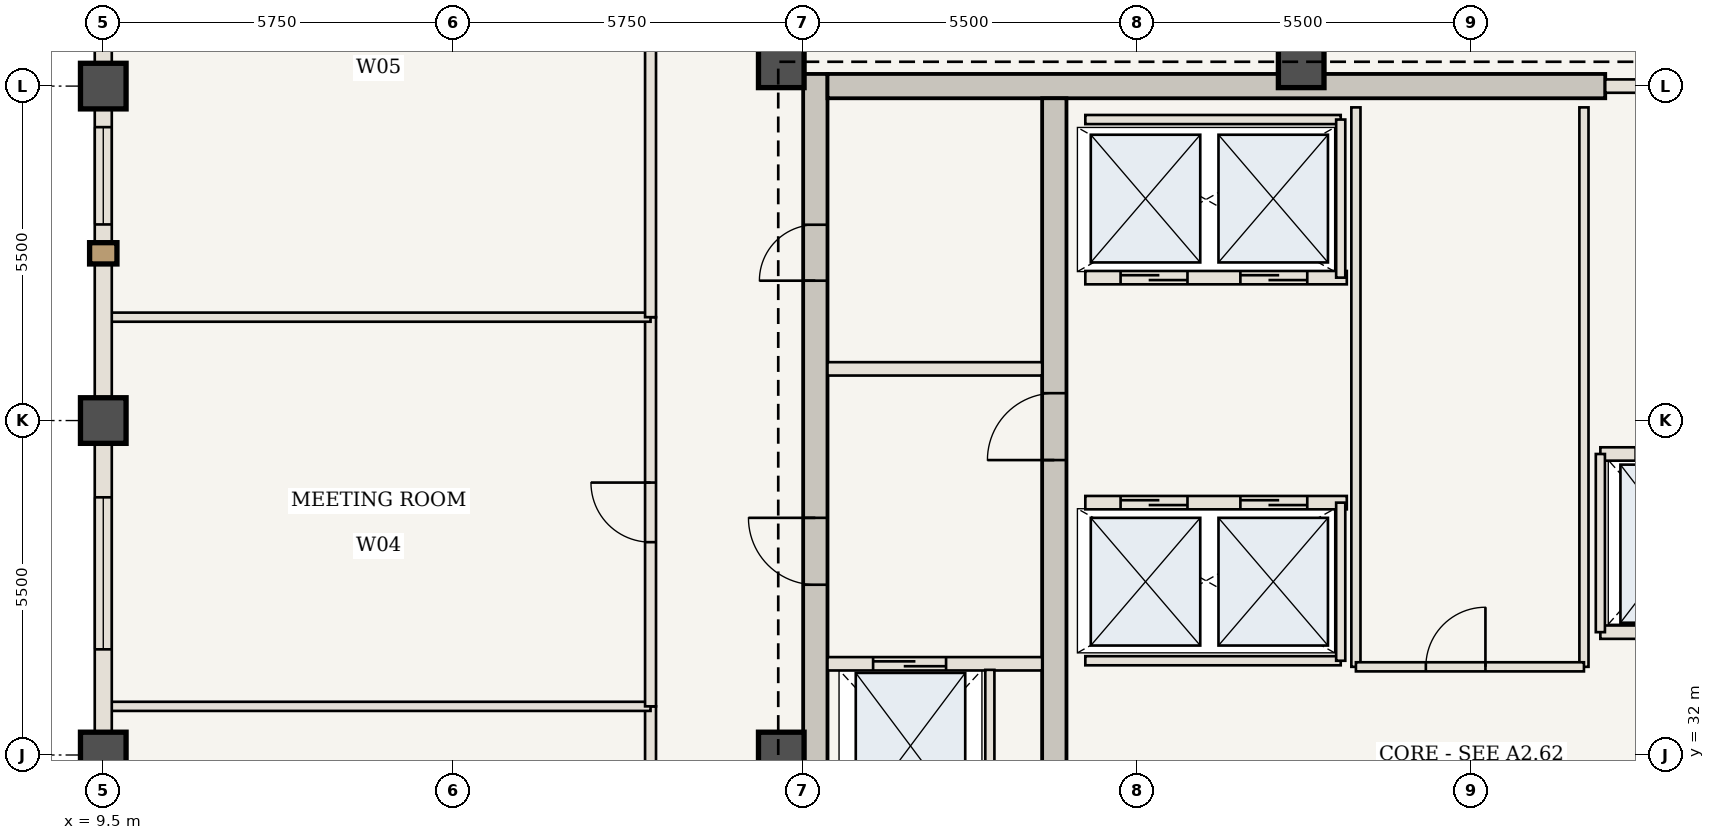
"""IFC4 building model, lengths in metres.
Left out: names, types, materials, properties, quantities, classifications, styles, units other than length and angle.
Written with IfcOpenShell. Run it as: python <this file> out.ifc"""

import sys

from ifc_helpers import new_model, si_unit, direction, frame, frame_2d, origin, origin_2d, place, context, subcontext, project, spatial, rectangle, extrude, element, fill, save


model = new_model("IFC4")
c1 = context("Model", 3, precision=1e-05, world=origin(), true_north=direction((0.0, 1.0)))
c2 = subcontext(c1, "Body", "Model", "MODEL_VIEW")
j1 = project(units=[si_unit("LENGTHUNIT", "METRE"), si_unit("PLANEANGLEUNIT", "RADIAN")], contexts=[c1])
p1 = place(None, origin())
s1 = spatial("IfcSite", under=j1, at=p1, CompositionType="ELEMENT")
p2 = place(p1, origin())
s2 = spatial("IfcBuilding", under=s1, at=p2, CompositionType="ELEMENT")
p3 = place(p2, frame((0.0, 0.0, 289.1)))
s3 = spatial("IfcBuildingStorey", under=s2, at=p3, CompositionType="ELEMENT", Elevation=289.1)
p4 = place(p3, frame((21.21, 30.6, 0.0), z_axis=(0.0, 0.0, 1.0), x_axis=(0.0, 1.0, 0.0)))
e1 = element("IfcWall", 1, at=p4, inside=s3, PredefinedType="SHEAR", context=c2, shape_type="SweptSolid", body=[
    extrude(rectangle(XDim=12.6, YDim=0.4, at=frame_2d((6.3, 0.0))), origin(), (0.0, 0.0, 1.0), 3.85),
])
p5 = place(p4, frame((4.2, 0.0, 0.0)))
e2 = element("IfcOpeningElement", 2, at=p5, cuts=e1, PredefinedType="OPENING", context=c2, shape_type="SweptSolid", body=[
    extrude(rectangle(XDim=1.1, YDim=2.15, at=frame_2d((0.55, 1.075))), frame((0.0, 0.21, 0.0), z_axis=(0.0, -1.0, 0.0), x_axis=(1.0, 0.0, 0.0)), (0.0, 0.0, 1.0), 0.42),
])
p6 = place(p4, frame((9.2, 0.0, 0.0)))
e3 = element("IfcOpeningElement", 3, at=p6, cuts=e1, PredefinedType="OPENING", context=c2, shape_type="SweptSolid", body=[
    extrude(rectangle(XDim=0.92, YDim=2.1, at=frame_2d((0.46, 1.05))), frame((0.0, 0.21, 0.0), z_axis=(0.0, -1.0, 0.0), x_axis=(1.0, 0.0, 0.0)), (0.0, 0.0, 1.0), 0.42),
])
p7 = place(p3, frame((21.41, 43.0, 0.0), z_axis=(0.0, 0.0, 1.0), x_axis=(1.0, 0.0, 0.0)))
e4 = element("IfcWall", 4, at=p7, inside=s3, PredefinedType="SHEAR", context=c2, shape_type="SweptSolid", body=[
    extrude(rectangle(XDim=12.79, YDim=0.4, at=frame_2d((6.395, 0.0))), origin(), (0.0, 0.0, 1.0), 3.85),
])
p8 = place(p3, frame((25.14, 30.6, 0.0), z_axis=(0.0, 0.0, 1.0), x_axis=(0.0, 1.0, 0.0)))
e5 = element("IfcWall", 5, at=p8, inside=s3, PredefinedType="SHEAR", context=c2, shape_type="SweptSolid", body=[
    extrude(rectangle(XDim=12.2, YDim=0.4, at=frame_2d((6.1, 0.0))), origin(), (0.0, 0.0, 1.0), 3.85),
])
p9 = place(p8, frame((6.25, 0.0, 0.0)))
e6 = element("IfcOpeningElement", 6, at=p9, cuts=e5, PredefinedType="OPENING", context=c2, shape_type="SweptSolid", body=[
    extrude(rectangle(XDim=1.1, YDim=2.15, at=frame_2d((0.55, 1.075))), frame((0.0, 0.21, 0.0), z_axis=(0.0, -1.0, 0.0), x_axis=(1.0, 0.0, 0.0)), (0.0, 0.0, 1.0), 0.42),
])
for number, where, z_axis, x_axis in (
    (7, (29.2, 43.35, 0.0), (0.0, 0.0, 1.0), (1.0, 0.0, 0.0)),
    (8, (20.65, 43.35, 0.0), (0.0, 0.0, 1.0), (1.0, 0.0, 0.0)),
    (9, (20.65, 32.0, 0.0), (0.0, 0.0, 1.0), (1.0, 0.0, 0.0)),
    (10, (9.5, 32.0, 0.0), (0.0, 0.0, 1.0), (1.0, 0.0, 0.0)),
    (11, (9.5, 37.5, 0.0), (0.0, 0.0, 1.0), (1.0, 0.0, 0.0)),
    (12, (9.5, 43.0, 0.0), (0.0, 0.0, 1.0), (1.0, 0.0, 0.0)),
):
    element("IfcColumn", number, at=place(p3, frame(where, z_axis=z_axis, x_axis=x_axis)), inside=s3, PredefinedType="COLUMN", context=c2, shape_type="SweptSolid", body=[
        extrude(rectangle(XDim=0.75, YDim=0.75, at=origin_2d()), origin(), (0.0, 0.0, 1.0), 3.85),
    ])
p10 = place(p3, frame((21.41, 33.5, 0.0), z_axis=(0.0, 0.0, 1.0), x_axis=(1.0, 0.0, 0.0)))
e13 = element("IfcWall", 13, at=p10, inside=s3, PredefinedType="STANDARD", context=c2, shape_type="SweptSolid", body=[
    extrude(rectangle(XDim=3.53, YDim=0.22, at=frame_2d((1.765, 0.0))), origin(), (0.0, 0.0, 1.0), 3.685),
])
p11 = place(p10, frame((0.75, 0.0, 0.0)))
e14 = element("IfcOpeningElement", 14, at=p11, cuts=e13, PredefinedType="OPENING", context=c2, shape_type="SweptSolid", body=[
    extrude(rectangle(XDim=1.2, YDim=2.2, at=frame_2d((0.6, 1.1))), frame((0.0, 0.12, 0.0), z_axis=(0.0, -1.0, 0.0), x_axis=(1.0, 0.0, 0.0)), (0.0, 0.0, 1.0), 0.24),
])
p12 = place(p3, frame((24.08, 30.75, 0.0), z_axis=(0.0, 0.0, 1.0), x_axis=(0.0, 1.0, 0.0)))
e15 = element("IfcWall", 15, at=p12, inside=s3, PredefinedType="STANDARD", context=c2, shape_type="SweptSolid", body=[
    extrude(rectangle(XDim=2.65, YDim=0.15, at=frame_2d((1.325, 0.0))), origin(), (0.0, 0.0, 1.0), 3.685),
])
p13 = place(p3, frame((21.41, 38.35, 0.0), z_axis=(0.0, 0.0, 1.0), x_axis=(1.0, 0.0, 0.0)))
e16 = element("IfcWall", 16, at=p13, inside=s3, PredefinedType="STANDARD", context=c2, shape_type="SweptSolid", body=[
    extrude(rectangle(XDim=3.53, YDim=0.22, at=frame_2d((1.765, 0.0))), origin(), (0.0, 0.0, 1.0), 3.685),
])
p14 = place(p3, frame((25.65, 36.15, 0.0), z_axis=(0.0, 0.0, 1.0), x_axis=(1.0, 0.0, 0.0)))
e17 = element("IfcWall", 17, at=p14, inside=s3, PredefinedType="STANDARD", context=c2, shape_type="SweptSolid", body=[
    extrude(rectangle(XDim=4.3, YDim=0.22, at=frame_2d((2.15, 0.0))), origin(), (0.0, 0.0, 1.0), 3.685),
])
p15 = place(p14, frame((0.58, 0.0, 0.0)))
e18 = element("IfcOpeningElement", 18, at=p15, cuts=e17, PredefinedType="OPENING", context=c2, shape_type="SweptSolid", body=[
    extrude(rectangle(XDim=1.1, YDim=2.15, at=frame_2d((0.55, 1.075))), frame((0.0, 0.12, 0.0), z_axis=(0.0, -1.0, 0.0), x_axis=(1.0, 0.0, 0.0)), (0.0, 0.0, 1.0), 0.24),
])
p16 = place(p14, frame((2.55, 0.0, 0.0)))
e19 = element("IfcOpeningElement", 19, at=p16, cuts=e17, PredefinedType="OPENING", context=c2, shape_type="SweptSolid", body=[
    extrude(rectangle(XDim=1.1, YDim=2.15, at=frame_2d((0.55, 1.075))), frame((0.0, 0.12, 0.0), z_axis=(0.0, -1.0, 0.0), x_axis=(1.0, 0.0, 0.0)), (0.0, 0.0, 1.0), 0.24),
])
p17 = place(p3, frame((25.65, 33.55, 0.0), z_axis=(0.0, 0.0, 1.0), x_axis=(1.0, 0.0, 0.0)))
e20 = element("IfcWall", 20, at=p17, inside=s3, PredefinedType="STANDARD", context=c2, shape_type="SweptSolid", body=[
    extrude(rectangle(XDim=4.2, YDim=0.15, at=frame_2d((2.1, 0.0))), origin(), (0.0, 0.0, 1.0), 3.685),
])
p18 = place(p3, frame((29.85, 33.55, 0.0), z_axis=(0.0, 0.0, 1.0), x_axis=(0.0, 1.0, 0.0)))
e21 = element("IfcWall", 21, at=p18, inside=s3, PredefinedType="STANDARD", context=c2, shape_type="SweptSolid", body=[
    extrude(rectangle(XDim=2.6, YDim=0.15, at=frame_2d((1.3, 0.0))), origin(), (0.0, 0.0, 1.0), 3.685),
])
p19 = place(p3, frame((25.65, 39.85, 0.0), z_axis=(0.0, 0.0, 1.0), x_axis=(1.0, 0.0, 0.0)))
e22 = element("IfcWall", 22, at=p19, inside=s3, PredefinedType="STANDARD", context=c2, shape_type="SweptSolid", body=[
    extrude(rectangle(XDim=4.3, YDim=0.22, at=frame_2d((2.15, 0.0))), origin(), (0.0, 0.0, 1.0), 3.685),
])
p20 = place(p19, frame((0.58, 0.0, 0.0)))
e23 = element("IfcOpeningElement", 23, at=p20, cuts=e22, PredefinedType="OPENING", context=c2, shape_type="SweptSolid", body=[
    extrude(rectangle(XDim=1.1, YDim=2.15, at=frame_2d((0.55, 1.075))), frame((0.0, 0.12, 0.0), z_axis=(0.0, -1.0, 0.0), x_axis=(1.0, 0.0, 0.0)), (0.0, 0.0, 1.0), 0.24),
])
p21 = place(p19, frame((2.55, 0.0, 0.0)))
e24 = element("IfcOpeningElement", 24, at=p21, cuts=e22, PredefinedType="OPENING", context=c2, shape_type="SweptSolid", body=[
    extrude(rectangle(XDim=1.1, YDim=2.15, at=frame_2d((0.55, 1.075))), frame((0.0, 0.12, 0.0), z_axis=(0.0, -1.0, 0.0), x_axis=(1.0, 0.0, 0.0)), (0.0, 0.0, 1.0), 0.24),
])
p22 = place(p3, frame((25.65, 42.45, 0.0), z_axis=(0.0, 0.0, 1.0), x_axis=(1.0, 0.0, 0.0)))
e25 = element("IfcWall", 25, at=p22, inside=s3, PredefinedType="STANDARD", context=c2, shape_type="SweptSolid", body=[
    extrude(rectangle(XDim=4.2, YDim=0.15, at=frame_2d((2.1, 0.0))), origin(), (0.0, 0.0, 1.0), 3.685),
])
p23 = place(p3, frame((29.85, 39.85, 0.0), z_axis=(0.0, 0.0, 1.0), x_axis=(0.0, 1.0, 0.0)))
e26 = element("IfcWall", 26, at=p23, inside=s3, PredefinedType="STANDARD", context=c2, shape_type="SweptSolid", body=[
    extrude(rectangle(XDim=2.6, YDim=0.15, at=frame_2d((1.3, 0.0))), origin(), (0.0, 0.0, 1.0), 3.685),
])
for number, where, z_axis, x_axis in (
    (27, (30.1, 33.45, 0.0), (0.0, 0.0, 1.0), (0.0, 1.0, 0.0)),
    (28, (33.85, 33.45, 0.0), (0.0, 0.0, 1.0), (0.0, 1.0, 0.0)),
):
    element("IfcWall", number, at=place(p3, frame(where, z_axis=z_axis, x_axis=x_axis)), inside=s3, PredefinedType="STANDARD", context=c2, shape_type="SweptSolid", body=[
        extrude(rectangle(XDim=9.2, YDim=0.15, at=frame_2d((4.6, 0.0))), origin(), (0.0, 0.0, 1.0), 3.685),
    ])
p24 = place(p3, frame((30.1, 33.45, 0.0), z_axis=(0.0, 0.0, 1.0), x_axis=(1.0, 0.0, 0.0)))
e29 = element("IfcWall", 29, at=p24, inside=s3, PredefinedType="STANDARD", context=c2, shape_type="SweptSolid", body=[
    extrude(rectangle(XDim=3.75, YDim=0.15, at=frame_2d((1.875, 0.0))), origin(), (0.0, 0.0, 1.0), 3.685),
])
p25 = place(p24, frame((1.15, 0.0, 0.0)))
e30 = element("IfcOpeningElement", 30, at=p25, cuts=e29, PredefinedType="OPENING", context=c2, shape_type="SweptSolid", body=[
    extrude(rectangle(XDim=0.98, YDim=2.2, at=frame_2d((0.49, 1.1))), frame((0.0, 0.085, 0.0), z_axis=(0.0, -1.0, 0.0), x_axis=(1.0, 0.0, 0.0)), (0.0, 0.0, 1.0), 0.17),
])
p26 = place(p3, frame((34.2, 43.0, 0.0), z_axis=(0.0, 0.0, 1.0), x_axis=(1.0, 0.0, 0.0)))
e31 = element("IfcWall", 31, at=p26, inside=s3, PredefinedType="STANDARD", context=c2, shape_type="SweptSolid", body=[
    extrude(rectangle(XDim=3.55, YDim=0.22, at=frame_2d((1.775, 0.0))), origin(), (0.0, 0.0, 1.0), 3.685),
])
p27 = place(p26, frame((1.4, 0.0, 0.0)))
e32 = element("IfcOpeningElement", 32, at=p27, cuts=e31, PredefinedType="OPENING", context=c2, shape_type="SweptSolid", body=[
    extrude(rectangle(XDim=1.1, YDim=2.15, at=frame_2d((0.55, 1.075))), frame((0.0, 0.12, 0.0), z_axis=(0.0, -1.0, 0.0), x_axis=(1.0, 0.0, 0.0)), (0.0, 0.0, 1.0), 0.24),
])
p28 = place(p3, frame((34.12, 36.95, 0.0), z_axis=(0.0, 0.0, 1.0), x_axis=(1.0, 0.0, 0.0)))
e33 = element("IfcWall", 33, at=p28, inside=s3, PredefinedType="STANDARD", context=c2, shape_type="SweptSolid", body=[
    extrude(rectangle(XDim=2.68, YDim=0.22, at=frame_2d((1.34, 0.0))), origin(), (0.0, 0.0, 1.0), 3.685),
])
p29 = place(p28, frame((0.58, 0.0, 0.0)))
e34 = element("IfcOpeningElement", 34, at=p29, cuts=e33, PredefinedType="OPENING", context=c2, shape_type="SweptSolid", body=[
    extrude(rectangle(XDim=1.2, YDim=2.2, at=frame_2d((0.6, 1.1))), frame((0.0, 0.12, 0.0), z_axis=(0.0, -1.0, 0.0), x_axis=(1.0, 0.0, 0.0)), (0.0, 0.0, 1.0), 0.24),
])
p30 = place(p3, frame((34.12, 34.02, 0.0), z_axis=(0.0, 0.0, 1.0), x_axis=(1.0, 0.0, 0.0)))
e35 = element("IfcWall", 35, at=p30, inside=s3, PredefinedType="STANDARD", context=c2, shape_type="SweptSolid", body=[
    extrude(rectangle(XDim=2.68, YDim=0.22, at=frame_2d((1.34, 0.0))), origin(), (0.0, 0.0, 1.0), 3.685),
])
p31 = place(p3, frame((34.12, 34.02, 0.0), z_axis=(0.0, 0.0, 1.0), x_axis=(0.0, 1.0, 0.0)))
e36 = element("IfcWall", 36, at=p31, inside=s3, PredefinedType="STANDARD", context=c2, shape_type="SweptSolid", body=[
    extrude(rectangle(XDim=2.93, YDim=0.15, at=frame_2d((1.465, 0.0))), origin(), (0.0, 0.0, 1.0), 3.685),
])
p32 = place(p3, frame((18.5, 26.8, 0.0), z_axis=(0.0, 0.0, 1.0), x_axis=(0.0, 1.0, 0.0)))
e37 = element("IfcWall", 37, at=p32, inside=s3, PredefinedType="STANDARD", context=c2, shape_type="SweptSolid", body=[
    extrude(rectangle(XDim=6.0, YDim=0.18, at=frame_2d((3.0, 0.0))), origin(), (0.0, 0.0, 1.0), 3.685),
])
p33 = place(p32, frame((2.5, 0.0, 0.0)))
e38 = element("IfcOpeningElement", 38, at=p33, cuts=e37, PredefinedType="OPENING", context=c2, shape_type="SweptSolid", body=[
    extrude(rectangle(XDim=0.98, YDim=2.2, at=frame_2d((0.49, 1.1))), frame((0.0, 0.1, 0.0), z_axis=(0.0, -1.0, 0.0), x_axis=(1.0, 0.0, 0.0)), (0.0, 0.0, 1.0), 0.2),
])
p34 = place(p3, frame((9.56, 32.8, 0.0), z_axis=(0.0, 0.0, 1.0), x_axis=(1.0, 0.0, 0.0)))
e39 = element("IfcWall", 39, at=p34, inside=s3, PredefinedType="STANDARD", context=c2, shape_type="SweptSolid", body=[
    extrude(rectangle(XDim=8.94, YDim=0.15, at=frame_2d((4.47, 0.0))), origin(), (0.0, 0.0, 1.0), 3.685),
])
p35 = place(p3, frame((18.5, 32.8, 0.0), z_axis=(0.0, 0.0, 1.0), x_axis=(0.0, 1.0, 0.0)))
e40 = element("IfcWall", 40, at=p35, inside=s3, PredefinedType="STANDARD", context=c2, shape_type="SweptSolid", body=[
    extrude(rectangle(XDim=6.4, YDim=0.18, at=frame_2d((3.2, 0.0))), origin(), (0.0, 0.0, 1.0), 3.685),
])
p36 = place(p35, frame((2.7, 0.0, 0.0)))
e41 = element("IfcOpeningElement", 41, at=p36, cuts=e40, PredefinedType="OPENING", context=c2, shape_type="SweptSolid", body=[
    extrude(rectangle(XDim=0.98, YDim=2.2, at=frame_2d((0.49, 1.1))), frame((0.0, 0.1, 0.0), z_axis=(0.0, -1.0, 0.0), x_axis=(1.0, 0.0, 0.0)), (0.0, 0.0, 1.0), 0.2),
])
p37 = place(p3, frame((9.56, 39.2, 0.0), z_axis=(0.0, 0.0, 1.0), x_axis=(1.0, 0.0, 0.0)))
e42 = element("IfcWall", 42, at=p37, inside=s3, PredefinedType="STANDARD", context=c2, shape_type="SweptSolid", body=[
    extrude(rectangle(XDim=8.94, YDim=0.15, at=frame_2d((4.47, 0.0))), origin(), (0.0, 0.0, 1.0), 3.685),
])
p38 = place(p3, frame((18.5, 39.2, 0.0), z_axis=(0.0, 0.0, 1.0), x_axis=(0.0, 1.0, 0.0)))
e43 = element("IfcWall", 43, at=p38, inside=s3, PredefinedType="STANDARD", context=c2, shape_type="SweptSolid", body=[
    extrude(rectangle(XDim=9.3, YDim=0.18, at=frame_2d((4.65, 0.0))), origin(), (0.0, 0.0, 1.0), 3.685),
])
p39 = place(p38, frame((5.6, 0.0, 0.0)))
e44 = element("IfcOpeningElement", 44, at=p39, cuts=e43, PredefinedType="OPENING", context=c2, shape_type="SweptSolid", body=[
    extrude(rectangle(XDim=0.98, YDim=2.2, at=frame_2d((0.49, 1.1))), frame((0.0, 0.1, 0.0), z_axis=(0.0, -1.0, 0.0), x_axis=(1.0, 0.0, 0.0)), (0.0, 0.0, 1.0), 0.2),
])
p40 = place(p3, frame((9.5, 26.5, 0.0), z_axis=(0.0, 0.0, 1.0), x_axis=(0.0, 1.0, 0.0)))
e45 = element("IfcWall", 45, at=p40, inside=s3, PredefinedType="USERDEFINED", context=c2, shape_type="SweptSolid", body=[
    extrude(rectangle(XDim=5.5, YDim=0.28, at=frame_2d((2.75, 0.0))), origin(), (0.0, 0.0, 1.0), 2.985),
])
p41 = place(p40, frame((1.5, 0.0, 0.85)))
e46 = element("IfcOpeningElement", 46, at=p41, cuts=e45, PredefinedType="OPENING", context=c2, shape_type="SweptSolid", body=[
    extrude(rectangle(XDim=2.5, YDim=1.935, at=frame_2d((1.25, 0.968))), frame((0.0, 0.15, 0.0), z_axis=(0.0, -1.0, 0.0), x_axis=(1.0, 0.0, 0.0)), (0.0, 0.0, 1.0), 0.3),
])
p42 = place(p3, frame((9.5, 32.0, 0.0), z_axis=(0.0, 0.0, 1.0), x_axis=(0.0, 1.0, 0.0)))
e47 = element("IfcWall", 47, at=p42, inside=s3, PredefinedType="USERDEFINED", context=c2, shape_type="SweptSolid", body=[
    extrude(rectangle(XDim=5.5, YDim=0.28, at=frame_2d((2.75, 0.0))), origin(), (0.0, 0.0, 1.0), 2.985),
])
p43 = place(p42, frame((1.738, 0.0, 0.85)))
e48 = element("IfcOpeningElement", 48, at=p43, cuts=e47, PredefinedType="OPENING", context=c2, shape_type="SweptSolid", body=[
    extrude(rectangle(XDim=2.5, YDim=1.935, at=frame_2d((1.25, 0.968))), frame((0.0, 0.15, 0.0), z_axis=(0.0, -1.0, 0.0), x_axis=(1.0, 0.0, 0.0)), (0.0, 0.0, 1.0), 0.3),
])
p44 = place(p3, frame((9.5, 37.5, 0.0), z_axis=(0.0, 0.0, 1.0), x_axis=(0.0, 1.0, 0.0)))
e49 = element("IfcWall", 49, at=p44, inside=s3, PredefinedType="USERDEFINED", context=c2, shape_type="SweptSolid", body=[
    extrude(rectangle(XDim=5.5, YDim=0.28, at=frame_2d((2.75, 0.0))), origin(), (0.0, 0.0, 1.0), 2.985),
])
p45 = place(p44, frame((3.225, 0.0, 0.85)))
e50 = element("IfcOpeningElement", 50, at=p45, cuts=e49, PredefinedType="OPENING", context=c2, shape_type="SweptSolid", body=[
    extrude(rectangle(XDim=1.6, YDim=1.935, at=frame_2d((0.8, 0.968))), frame((0.0, 0.15, 0.0), z_axis=(0.0, -1.0, 0.0), x_axis=(1.0, 0.0, 0.0)), (0.0, 0.0, 1.0), 0.3),
])
p46 = place(p3, frame((9.5, 43.0, 0.0), z_axis=(0.0, 0.0, 1.0), x_axis=(0.0, 1.0, 0.0)))
e51 = element("IfcWall", 51, at=p46, inside=s3, PredefinedType="USERDEFINED", context=c2, shape_type="SweptSolid", body=[
    extrude(rectangle(XDim=5.5, YDim=0.28, at=frame_2d((2.75, 0.0))), origin(), (0.0, 0.0, 1.0), 2.985),
])
p47 = place(p5, origin())
e52 = element("IfcDoor", 52, at=p47, inside=s3, OperationType="SINGLE_SWING_RIGHT", PredefinedType="DOOR", context=c2, shape_type="SweptSolid", body=[
    extrude(rectangle(XDim=1.1, YDim=2.15, at=frame_2d((0.55, 1.075))), frame((0.0, 0.025, 0.0), z_axis=(0.0, -1.0, 0.0), x_axis=(1.0, 0.0, 0.0)), (0.0, 0.0, 1.0), 0.05),
])
fill(e2, e52)
p48 = place(p9, origin())
e53 = element("IfcDoor", 53, at=p48, inside=s3, OperationType="SINGLE_SWING_LEFT", PredefinedType="DOOR", context=c2, shape_type="SweptSolid", body=[
    extrude(rectangle(XDim=1.1, YDim=2.15, at=frame_2d((0.55, 1.075))), frame((0.0, 0.025, 0.0), z_axis=(0.0, -1.0, 0.0), x_axis=(1.0, 0.0, 0.0)), (0.0, 0.0, 1.0), 0.05),
])
fill(e6, e53)
p49 = place(p6, origin())
e54 = element("IfcDoor", 54, at=p49, inside=s3, OperationType="SINGLE_SWING_LEFT", PredefinedType="DOOR", context=c2, shape_type="SweptSolid", body=[
    extrude(rectangle(XDim=0.92, YDim=2.1, at=frame_2d((0.46, 1.05))), frame((0.0, 0.025, 0.0), z_axis=(0.0, -1.0, 0.0), x_axis=(1.0, 0.0, 0.0)), (0.0, 0.0, 1.0), 0.05),
])
fill(e3, e54)
p50 = place(p11, origin())
e55 = element("IfcDoor", 55, at=p50, inside=s3, OperationType="DOUBLE_DOOR_SLIDING", PredefinedType="DOOR", context=c2, shape_type="SweptSolid", body=[
    extrude(rectangle(XDim=1.2, YDim=2.2, at=frame_2d((0.6, 1.1))), frame((0.0, 0.025, 0.0), z_axis=(0.0, -1.0, 0.0), x_axis=(1.0, 0.0, 0.0)), (0.0, 0.0, 1.0), 0.05),
])
fill(e14, e55)
p51 = place(p15, origin())
e56 = element("IfcDoor", 56, at=p51, inside=s3, OperationType="DOUBLE_DOOR_SLIDING", PredefinedType="DOOR", context=c2, shape_type="SweptSolid", body=[
    extrude(rectangle(XDim=1.1, YDim=2.15, at=frame_2d((0.55, 1.075))), frame((0.0, 0.025, 0.0), z_axis=(0.0, -1.0, 0.0), x_axis=(1.0, 0.0, 0.0)), (0.0, 0.0, 1.0), 0.05),
])
fill(e18, e56)
p52 = place(p16, origin())
e57 = element("IfcDoor", 57, at=p52, inside=s3, OperationType="DOUBLE_DOOR_SLIDING", PredefinedType="DOOR", context=c2, shape_type="SweptSolid", body=[
    extrude(rectangle(XDim=1.1, YDim=2.15, at=frame_2d((0.55, 1.075))), frame((0.0, 0.025, 0.0), z_axis=(0.0, -1.0, 0.0), x_axis=(1.0, 0.0, 0.0)), (0.0, 0.0, 1.0), 0.05),
])
fill(e19, e57)
p53 = place(p20, origin())
e58 = element("IfcDoor", 58, at=p53, inside=s3, OperationType="DOUBLE_DOOR_SLIDING", PredefinedType="DOOR", context=c2, shape_type="SweptSolid", body=[
    extrude(rectangle(XDim=1.1, YDim=2.15, at=frame_2d((0.55, 1.075))), frame((0.0, 0.025, 0.0), z_axis=(0.0, -1.0, 0.0), x_axis=(1.0, 0.0, 0.0)), (0.0, 0.0, 1.0), 0.05),
])
fill(e23, e58)
p54 = place(p21, origin())
e59 = element("IfcDoor", 59, at=p54, inside=s3, OperationType="DOUBLE_DOOR_SLIDING", PredefinedType="DOOR", context=c2, shape_type="SweptSolid", body=[
    extrude(rectangle(XDim=1.1, YDim=2.15, at=frame_2d((0.55, 1.075))), frame((0.0, 0.025, 0.0), z_axis=(0.0, -1.0, 0.0), x_axis=(1.0, 0.0, 0.0)), (0.0, 0.0, 1.0), 0.05),
])
fill(e24, e59)
p55 = place(p25, origin())
e60 = element("IfcDoor", 60, at=p55, inside=s3, OperationType="SINGLE_SWING_RIGHT", PredefinedType="DOOR", context=c2, shape_type="SweptSolid", body=[
    extrude(rectangle(XDim=0.98, YDim=2.2, at=frame_2d((0.49, 1.1))), frame((0.0, 0.025, 0.0), z_axis=(0.0, -1.0, 0.0), x_axis=(1.0, 0.0, 0.0)), (0.0, 0.0, 1.0), 0.05),
])
fill(e30, e60)
p56 = place(p36, origin())
e61 = element("IfcDoor", 61, at=p56, inside=s3, OperationType="SINGLE_SWING_RIGHT", PredefinedType="DOOR", context=c2, shape_type="SweptSolid", body=[
    extrude(rectangle(XDim=0.98, YDim=2.2, at=frame_2d((0.49, 1.1))), frame((0.0, 0.025, 0.0), z_axis=(0.0, -1.0, 0.0), x_axis=(1.0, 0.0, 0.0)), (0.0, 0.0, 1.0), 0.05),
])
fill(e41, e61)
p57 = place(p43, origin())
e62 = element("IfcWindow", 62, at=p57, inside=s3, PartitioningType="SINGLE_PANEL", PredefinedType="WINDOW", context=c2, shape_type="SweptSolid", body=[
    extrude(rectangle(XDim=2.5, YDim=1.935, at=frame_2d((1.25, 0.968))), frame((0.0, 0.03, 0.0), z_axis=(0.0, -1.0, 0.0), x_axis=(1.0, 0.0, 0.0)), (0.0, 0.0, 1.0), 0.06),
])
fill(e48, e62)
p58 = place(p45, origin())
e63 = element("IfcWindow", 63, at=p58, inside=s3, PartitioningType="SINGLE_PANEL", PredefinedType="WINDOW", context=c2, shape_type="SweptSolid", body=[
    extrude(rectangle(XDim=1.6, YDim=1.935, at=frame_2d((0.8, 0.968))), frame((0.0, 0.03, 0.0), z_axis=(0.0, -1.0, 0.0), x_axis=(1.0, 0.0, 0.0)), (0.0, 0.0, 1.0), 0.06),
])
fill(e50, e63)
save(model, sys.argv[1])
